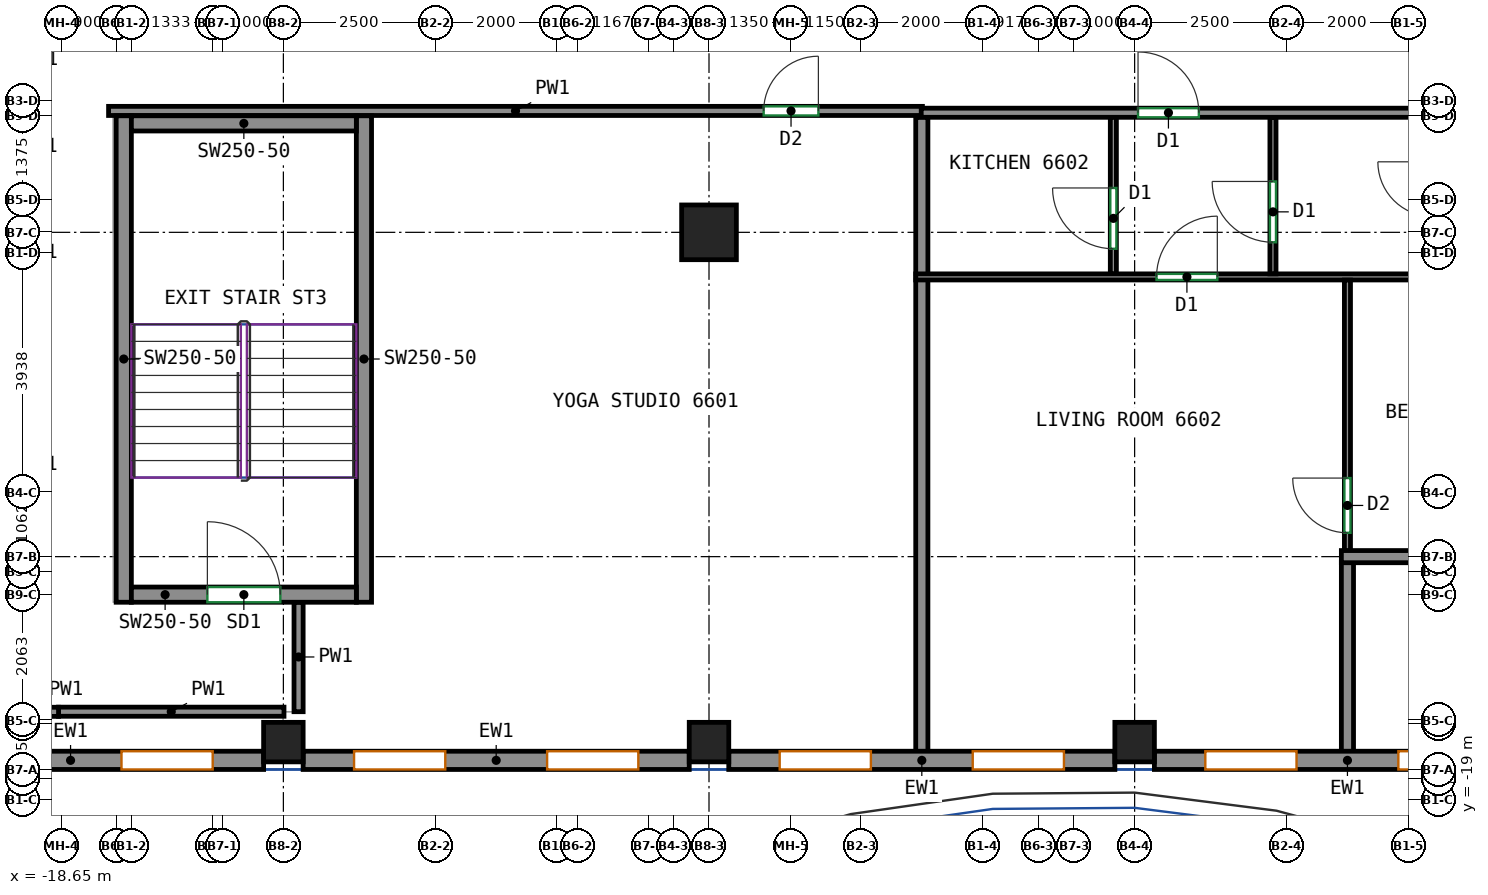
"""IFC4 building model, lengths in metres.
Left out: names, types, materials, properties, quantities, classifications, styles, units other than length and angle.
Written with IfcOpenShell. Run it as: python <this file> out.ifc"""

import sys

from ifc_helpers import new_model, si_unit, direction, frame, frame_2d, origin, origin_2d, place, context, subcontext, project, spatial, rectangle, extrude, source, transform, mapped, element, fill, save


model = new_model("IFC4")
c1 = context("Model", 3, precision=1e-05, world=origin(), true_north=direction((0.0, 1.0)))
c2 = subcontext(c1, "Body", "Model", "MODEL_VIEW")
j1 = project(units=[si_unit("LENGTHUNIT", "METRE"), si_unit("PLANEANGLEUNIT", "RADIAN")], contexts=[c1])
p1 = place(None, origin())
s1 = spatial("IfcSite", under=j1, at=p1, CompositionType="ELEMENT")
p2 = place(p1, origin())
s2 = spatial("IfcBuilding", under=s1, at=p2, CompositionType="ELEMENT")
p3 = place(p2, frame((0.0, 0.0, 270.4)))
s3 = spatial("IfcBuildingStorey", under=s2, at=p3, CompositionType="ELEMENT", Elevation=270.4)
m1 = source(origin(), c2, "Body", "SweptSolid", [
    extrude(rectangle(XDim=0.65, YDim=0.65, at=origin_2d()), origin(), (0.0, 0.0, 1.0), 3.12),
])
for number, where, z_axis, x_axis in (
    (1, (-15.0, -18.05, 0.0), (0.0, 0.0, 1.0), (1.0, 0.0, 0.0)),
    (2, (-8.0, -18.05, 0.0), (0.0, 0.0, 1.0), (1.0, 0.0, 0.0)),
):
    element("IfcColumn", number, at=place(p3, frame(where, z_axis=z_axis, x_axis=x_axis)), inside=s3, PredefinedType="COLUMN", context=c2, shape_type="MappedRepresentation", body=[
        mapped(m1, transform((0.0, 0.0, 0.0))),
    ])
m2 = source(origin(), c2, "Body", "SweptSolid", [
    extrude(rectangle(XDim=0.9, YDim=0.9, at=origin_2d()), origin(), (0.0, 0.0, 1.0), 3.12),
])
p4 = place(p3, frame((-8.0, -9.667, 0.0), z_axis=(0.0, 0.0, 1.0), x_axis=(1.0, 0.0, 0.0)))
e3 = element("IfcColumn", 3, at=p4, inside=s3, PredefinedType="COLUMN", context=c2, shape_type="MappedRepresentation", body=[
    mapped(m2, transform((0.0, 0.0, 0.0))),
])
p5 = place(p3, frame((-1.0, -18.05, 0.0), z_axis=(0.0, 0.0, 1.0), x_axis=(1.0, 0.0, 0.0)))
e4 = element("IfcColumn", 4, at=p5, inside=s3, PredefinedType="COLUMN", context=c2, shape_type="MappedRepresentation", body=[
    mapped(m1, transform((0.0, 0.0, 0.0))),
])
m3 = source(origin(), c2, "Body", "SweptSolid", [
    extrude(rectangle(XDim=8.0, YDim=0.25, at=frame_2d((4.0, 0.0))), origin(), (0.0, 0.0, 1.0), 3.12),
])
for number, where, z_axis, x_axis in (
    (5, (-17.625, -15.75, 0.0), (0.0, 0.0, 1.0), (0.0, 1.0, 0.0)),
    (6, (-13.675, -15.75, 0.0), (0.0, 0.0, 1.0), (0.0, 1.0, 0.0)),
):
    element("IfcWall", number, at=place(p3, frame(where, z_axis=z_axis, x_axis=x_axis)), inside=s3, PredefinedType="SHEAR", context=c2, shape_type="MappedRepresentation", body=[
        mapped(m3, transform((0.0, 0.0, 0.0))),
    ])
m4 = source(origin(), c2, "Body", "SweptSolid", [
    extrude(rectangle(XDim=3.7, YDim=0.25, at=frame_2d((1.85, 0.0))), origin(), (0.0, 0.0, 1.0), 3.12),
])
p6 = place(p3, frame((-17.5, -15.625, 0.0), z_axis=(0.0, 0.0, 1.0), x_axis=(1.0, 0.0, 0.0)))
e7 = element("IfcWall", 7, at=p6, inside=s3, PredefinedType="SHEAR", context=c2, shape_type="MappedRepresentation", body=[
    mapped(m4, transform((0.0, 0.0, 0.0))),
])
p7 = place(p6, frame((1.25, 0.0, 0.0)))
e8 = element("IfcOpeningElement", 8, at=p7, cuts=e7, PredefinedType="OPENING", context=c2, shape_type="SweptSolid", body=[
    extrude(rectangle(XDim=1.2, YDim=2.1, at=frame_2d((0.6, 1.05))), frame((0.0, 0.135, 0.0), z_axis=(0.0, -1.0, 0.0), x_axis=(1.0, 0.0, 0.0)), (0.0, 0.0, 1.0), 0.27),
])
p8 = place(p3, frame((-17.5, -7.875, 0.0), z_axis=(0.0, 0.0, 1.0), x_axis=(1.0, 0.0, 0.0)))
e9 = element("IfcWall", 9, at=p8, inside=s3, PredefinedType="SHEAR", context=c2, shape_type="MappedRepresentation", body=[
    mapped(m4, transform((0.0, 0.0, 0.0))),
])
m5 = source(origin(), c2, "Body", "SweptSolid", [
    extrude(rectangle(XDim=6.35, YDim=0.3, at=frame_2d((3.175, 0.0))), origin(), (0.0, 0.0, 1.0), 3.12),
])
p9 = place(p3, frame((-21.675, -18.35, 0.0), z_axis=(0.0, 0.0, 1.0), x_axis=(1.0, 0.0, 0.0)))
e10 = element("IfcWall", 10, at=p9, inside=s3, PredefinedType="SOLIDWALL", context=c2, shape_type="MappedRepresentation", body=[
    mapped(m5, transform((0.0, 0.0, 0.0))),
])
p10 = place(p9, frame((0.837, 0.0, 0.8)))
e11 = element("IfcOpeningElement", 11, at=p10, cuts=e10, PredefinedType="OPENING", context=c2, shape_type="SweptSolid", body=[
    extrude(rectangle(XDim=1.5, YDim=2.05, at=frame_2d((0.75, 1.025))), frame((0.0, 0.16, 0.0), z_axis=(0.0, -1.0, 0.0), x_axis=(1.0, 0.0, 0.0)), (0.0, 0.0, 1.0), 0.32),
])
p11 = place(p9, frame((4.012, 0.0, 0.8)))
e12 = element("IfcOpeningElement", 12, at=p11, cuts=e10, PredefinedType="OPENING", context=c2, shape_type="SweptSolid", body=[
    extrude(rectangle(XDim=1.5, YDim=2.05, at=frame_2d((0.75, 1.025))), frame((0.0, 0.16, 0.0), z_axis=(0.0, -1.0, 0.0), x_axis=(1.0, 0.0, 0.0)), (0.0, 0.0, 1.0), 0.32),
])
p12 = place(p3, frame((-14.675, -18.35, 0.0), z_axis=(0.0, 0.0, 1.0), x_axis=(1.0, 0.0, 0.0)))
e13 = element("IfcWall", 13, at=p12, inside=s3, PredefinedType="SOLIDWALL", context=c2, shape_type="MappedRepresentation", body=[
    mapped(m5, transform((0.0, 0.0, 0.0))),
])
p13 = place(p12, frame((0.837, 0.0, 0.8)))
e14 = element("IfcOpeningElement", 14, at=p13, cuts=e13, PredefinedType="OPENING", context=c2, shape_type="SweptSolid", body=[
    extrude(rectangle(XDim=1.5, YDim=2.05, at=frame_2d((0.75, 1.025))), frame((0.0, 0.16, 0.0), z_axis=(0.0, -1.0, 0.0), x_axis=(1.0, 0.0, 0.0)), (0.0, 0.0, 1.0), 0.32),
])
p14 = place(p12, frame((4.012, 0.0, 0.8)))
e15 = element("IfcOpeningElement", 15, at=p14, cuts=e13, PredefinedType="OPENING", context=c2, shape_type="SweptSolid", body=[
    extrude(rectangle(XDim=1.5, YDim=2.05, at=frame_2d((0.75, 1.025))), frame((0.0, 0.16, 0.0), z_axis=(0.0, -1.0, 0.0), x_axis=(1.0, 0.0, 0.0)), (0.0, 0.0, 1.0), 0.32),
])
p15 = place(p3, frame((-7.675, -18.35, 0.0), z_axis=(0.0, 0.0, 1.0), x_axis=(1.0, 0.0, 0.0)))
e16 = element("IfcWall", 16, at=p15, inside=s3, PredefinedType="SOLIDWALL", context=c2, shape_type="MappedRepresentation", body=[
    mapped(m5, transform((0.0, 0.0, 0.0))),
])
p16 = place(p15, frame((0.837, 0.0, 0.8)))
e17 = element("IfcOpeningElement", 17, at=p16, cuts=e16, PredefinedType="OPENING", context=c2, shape_type="SweptSolid", body=[
    extrude(rectangle(XDim=1.5, YDim=2.05, at=frame_2d((0.75, 1.025))), frame((0.0, 0.16, 0.0), z_axis=(0.0, -1.0, 0.0), x_axis=(1.0, 0.0, 0.0)), (0.0, 0.0, 1.0), 0.32),
])
p17 = place(p15, frame((4.012, 0.0, 0.8)))
e18 = element("IfcOpeningElement", 18, at=p17, cuts=e16, PredefinedType="OPENING", context=c2, shape_type="SweptSolid", body=[
    extrude(rectangle(XDim=1.5, YDim=2.05, at=frame_2d((0.75, 1.025))), frame((0.0, 0.16, 0.0), z_axis=(0.0, -1.0, 0.0), x_axis=(1.0, 0.0, 0.0)), (0.0, 0.0, 1.0), 0.32),
])
p18 = place(p3, frame((-0.675, -18.35, 0.0), z_axis=(0.0, 0.0, 1.0), x_axis=(1.0, 0.0, 0.0)))
e19 = element("IfcWall", 19, at=p18, inside=s3, PredefinedType="SOLIDWALL", context=c2, shape_type="MappedRepresentation", body=[
    mapped(m5, transform((0.0, 0.0, 0.0))),
])
p19 = place(p18, frame((0.837, 0.0, 0.8)))
e20 = element("IfcOpeningElement", 20, at=p19, cuts=e19, PredefinedType="OPENING", context=c2, shape_type="SweptSolid", body=[
    extrude(rectangle(XDim=1.5, YDim=2.05, at=frame_2d((0.75, 1.025))), frame((0.0, 0.16, 0.0), z_axis=(0.0, -1.0, 0.0), x_axis=(1.0, 0.0, 0.0)), (0.0, 0.0, 1.0), 0.32),
])
p20 = place(p18, frame((4.012, 0.0, 0.8)))
e21 = element("IfcOpeningElement", 21, at=p20, cuts=e19, PredefinedType="OPENING", context=c2, shape_type="SweptSolid", body=[
    extrude(rectangle(XDim=1.5, YDim=2.05, at=frame_2d((0.75, 1.025))), frame((0.0, 0.16, 0.0), z_axis=(0.0, -1.0, 0.0), x_axis=(1.0, 0.0, 0.0)), (0.0, 0.0, 1.0), 0.32),
])
p21 = place(p3, frame((-17.875, -7.67, 0.0), z_axis=(0.0, 0.0, 1.0), x_axis=(1.0, 0.0, 0.0)))
e22 = element("IfcWall", 22, at=p21, inside=s3, PredefinedType="PARTITIONING", context=c2, shape_type="SweptSolid", body=[
    extrude(rectangle(XDim=13.385, YDim=0.15, at=frame_2d((6.692, 0.0))), origin(), (0.0, 0.0, 1.0), 3.12),
])
p22 = place(p21, frame((10.774, 0.0, 0.0)))
e23 = element("IfcOpeningElement", 23, at=p22, cuts=e22, PredefinedType="OPENING", context=c2, shape_type="SweptSolid", body=[
    extrude(rectangle(XDim=0.9, YDim=2.1, at=frame_2d((0.45, 1.05))), frame((0.0, 0.085, 0.0), z_axis=(0.0, -1.0, 0.0), x_axis=(1.0, 0.0, 0.0)), (0.0, 0.0, 1.0), 0.17),
])
p23 = place(p3, frame((-14.75, -17.55, 0.0), z_axis=(0.0, 0.0, 1.0), x_axis=(0.0, 1.0, 0.0)))
e24 = element("IfcWall", 24, at=p23, inside=s3, PredefinedType="PARTITIONING", context=c2, shape_type="SweptSolid", body=[
    extrude(rectangle(XDim=1.8, YDim=0.15, at=frame_2d((0.9, 0.0))), origin(), (0.0, 0.0, 1.0), 3.12),
])
p24 = place(p3, frame((-18.698, -17.55, 0.0), z_axis=(0.0, 0.0, 1.0), x_axis=(1.0, 0.0, 0.0)))
e25 = element("IfcWall", 25, at=p24, inside=s3, PredefinedType="PARTITIONING", context=c2, shape_type="SweptSolid", body=[
    extrude(rectangle(XDim=3.708, YDim=0.15, at=frame_2d((1.854, 0.0))), origin(), (0.0, 0.0, 1.0), 3.12),
])
p25 = place(p3, frame((-19.677, -17.552, 0.0), z_axis=(0.0, 0.0, 1.0), x_axis=(1.0, 0.0, 0.0)))
e26 = element("IfcWall", 26, at=p25, inside=s3, PredefinedType="PARTITIONING", context=c2, shape_type="SweptSolid", body=[
    extrude(rectangle(XDim=0.979, YDim=0.15, at=frame_2d((0.49, 0.0))), origin(), (0.0, 0.0, 1.0), 3.12),
])
p26 = place(p3, frame((-4.51, -7.7, 0.0), z_axis=(0.0, 0.0, 1.0), x_axis=(1.0, 0.0, 0.0)))
e27 = element("IfcWall", 27, at=p26, inside=s3, PredefinedType="PARTITIONING", context=c2, shape_type="SweptSolid", body=[
    extrude(rectangle(XDim=19.76, YDim=0.15, at=frame_2d((9.88, 0.0))), origin(), (0.0, 0.0, 1.0), 3.12),
])
p27 = place(p26, frame((3.566, 0.0, 0.0)))
e28 = element("IfcOpeningElement", 28, at=p27, cuts=e27, PredefinedType="OPENING", context=c2, shape_type="SweptSolid", body=[
    extrude(rectangle(XDim=1.0, YDim=2.1, at=frame_2d((0.5, 1.05))), frame((0.0, 0.085, 0.0), z_axis=(0.0, -1.0, 0.0), x_axis=(1.0, 0.0, 0.0)), (0.0, 0.0, 1.0), 0.17),
])
p28 = place(p26, frame((16.08, 0.0, 0.0)))
e29 = element("IfcOpeningElement", 29, at=p28, cuts=e27, PredefinedType="OPENING", context=c2, shape_type="SweptSolid", body=[
    extrude(rectangle(XDim=1.0, YDim=2.1, at=frame_2d((0.5, 1.05))), frame((0.0, 0.085, 0.0), z_axis=(0.0, -1.0, 0.0), x_axis=(1.0, 0.0, 0.0)), (0.0, 0.0, 1.0), 0.17),
])
p29 = place(p3, frame((-4.5, -10.36, 0.0), z_axis=(0.0, 0.0, 1.0), x_axis=(0.0, 1.0, 0.0)))
e30 = element("IfcWall", 30, at=p29, inside=s3, PredefinedType="PARTITIONING", context=c2, shape_type="SweptSolid", body=[
    extrude(rectangle(XDim=2.583, YDim=0.2, at=frame_2d((1.292, 0.0))), origin(), (0.0, 0.0, 1.0), 3.12),
])
p30 = place(p3, frame((-4.5, -18.25, 0.0), z_axis=(0.0, 0.0, 1.0), x_axis=(0.0, 1.0, 0.0)))
e31 = element("IfcWall", 31, at=p30, inside=s3, PredefinedType="PARTITIONING", context=c2, shape_type="SweptSolid", body=[
    extrude(rectangle(XDim=7.808, YDim=0.2, at=frame_2d((3.904, 0.0))), origin(), (0.0, 0.0, 1.0), 3.12),
])
p31 = place(p3, frame((-1.35, -10.35, 0.0), z_axis=(0.0, 0.0, 1.0), x_axis=(0.0, 1.0, 0.0)))
e32 = element("IfcWall", 32, at=p31, inside=s3, PredefinedType="PARTITIONING", context=c2, shape_type="SweptSolid", body=[
    extrude(rectangle(XDim=2.573, YDim=0.1, at=frame_2d((1.287, 0.0))), origin(), (0.0, 0.0, 1.0), 3.12),
])
p32 = place(p31, frame((0.413, 0.0, 0.0)))
e33 = element("IfcOpeningElement", 33, at=p32, cuts=e32, PredefinedType="OPENING", context=c2, shape_type="SweptSolid", body=[
    extrude(rectangle(XDim=1.0, YDim=2.1, at=frame_2d((0.5, 1.05))), frame((0.0, 0.06, 0.0), z_axis=(0.0, -1.0, 0.0), x_axis=(1.0, 0.0, 0.0)), (0.0, 0.0, 1.0), 0.12),
])
p33 = place(p3, frame((-4.6, -10.4, 0.0), z_axis=(0.0, 0.0, 1.0), x_axis=(1.0, 0.0, 0.0)))
e34 = element("IfcWall", 34, at=p33, inside=s3, PredefinedType="PARTITIONING", context=c2, shape_type="SweptSolid", body=[
    extrude(rectangle(XDim=22.35, YDim=0.1, at=frame_2d((11.175, 0.0))), origin(), (0.0, 0.0, 1.0), 3.12),
])
p34 = place(p33, frame((3.96, 0.0, 0.0)))
e35 = element("IfcOpeningElement", 35, at=p34, cuts=e34, PredefinedType="OPENING", context=c2, shape_type="SweptSolid", body=[
    extrude(rectangle(XDim=1.0, YDim=2.1, at=frame_2d((0.5, 1.05))), frame((0.0, 0.06, 0.0), z_axis=(0.0, -1.0, 0.0), x_axis=(1.0, 0.0, 0.0)), (0.0, 0.0, 1.0), 0.12),
])
p35 = place(p33, frame((15.666, 0.0, 0.0)))
e36 = element("IfcOpeningElement", 36, at=p35, cuts=e34, PredefinedType="OPENING", context=c2, shape_type="SweptSolid", body=[
    extrude(rectangle(XDim=1.0, YDim=2.1, at=frame_2d((0.5, 1.05))), frame((0.0, 0.06, 0.0), z_axis=(0.0, -1.0, 0.0), x_axis=(1.0, 0.0, 0.0)), (0.0, 0.0, 1.0), 0.12),
])
p36 = place(p33, frame((18.109, 0.0, 0.0)))
e37 = element("IfcOpeningElement", 37, at=p36, cuts=e34, PredefinedType="OPENING", context=c2, shape_type="SweptSolid", body=[
    extrude(rectangle(XDim=1.0, YDim=2.1, at=frame_2d((0.5, 1.05))), frame((0.0, 0.06, 0.0), z_axis=(0.0, -1.0, 0.0), x_axis=(1.0, 0.0, 0.0)), (0.0, 0.0, 1.0), 0.12),
])
p37 = place(p3, frame((1.275, -10.35, 0.0), z_axis=(0.0, 0.0, 1.0), x_axis=(0.0, 1.0, 0.0)))
e38 = element("IfcWall", 38, at=p37, inside=s3, PredefinedType="PARTITIONING", context=c2, shape_type="SweptSolid", body=[
    extrude(rectangle(XDim=2.573, YDim=0.1, at=frame_2d((1.287, 0.0))), origin(), (0.0, 0.0, 1.0), 3.12),
])
p38 = place(p37, frame((0.52, 0.0, 0.0)))
e39 = element("IfcOpeningElement", 39, at=p38, cuts=e38, PredefinedType="OPENING", context=c2, shape_type="SweptSolid", body=[
    extrude(rectangle(XDim=1.0, YDim=2.1, at=frame_2d((0.5, 1.05))), frame((0.0, 0.06, 0.0), z_axis=(0.0, -1.0, 0.0), x_axis=(1.0, 0.0, 0.0)), (0.0, 0.0, 1.0), 0.12),
])
p39 = place(p3, frame((2.5, -14.91, 0.0), z_axis=(0.0, 0.0, 1.0), x_axis=(0.0, 1.0, 0.0)))
e40 = element("IfcWall", 40, at=p39, inside=s3, PredefinedType="PARTITIONING", context=c2, shape_type="SweptSolid", body=[
    extrude(rectangle(XDim=4.458, YDim=0.1, at=frame_2d((2.229, 0.0))), origin(), (0.0, 0.0, 1.0), 3.12),
])
p40 = place(p39, frame((0.302, 0.0, 0.0)))
e41 = element("IfcOpeningElement", 41, at=p40, cuts=e40, PredefinedType="OPENING", context=c2, shape_type="SweptSolid", body=[
    extrude(rectangle(XDim=0.9, YDim=2.1, at=frame_2d((0.45, 1.05))), frame((0.0, 0.06, 0.0), z_axis=(0.0, -1.0, 0.0), x_axis=(1.0, 0.0, 0.0)), (0.0, 0.0, 1.0), 0.12),
])
p41 = place(p3, frame((2.5, -18.25, 0.0), z_axis=(0.0, 0.0, 1.0), x_axis=(0.0, 1.0, 0.0)))
e42 = element("IfcWall", 42, at=p41, inside=s3, PredefinedType="PARTITIONING", context=c2, shape_type="SweptSolid", body=[
    extrude(rectangle(XDim=3.16, YDim=0.2, at=frame_2d((1.58, 0.0))), origin(), (0.0, 0.0, 1.0), 3.12),
])
p42 = place(p3, frame((2.4, -15.0, 0.0), z_axis=(0.0, 0.0, 1.0), x_axis=(1.0, 0.0, 0.0)))
e43 = element("IfcWall", 43, at=p42, inside=s3, PredefinedType="PARTITIONING", context=c2, shape_type="SweptSolid", body=[
    extrude(rectangle(XDim=3.7, YDim=0.2, at=frame_2d((1.85, 0.0))), origin(), (0.0, 0.0, 1.0), 3.12),
])
p43 = place(p11, origin())
e44 = element("IfcWindow", 44, at=p43, inside=s3, PartitioningType="SINGLE_PANEL", PredefinedType="WINDOW", context=c2, shape_type="SweptSolid", body=[
    extrude(rectangle(XDim=1.5, YDim=2.05, at=frame_2d((0.75, 1.025))), frame((0.0, 0.03, 0.0), z_axis=(0.0, -1.0, 0.0), x_axis=(1.0, 0.0, 0.0)), (0.0, 0.0, 1.0), 0.06),
])
fill(e12, e44)
p44 = place(p13, origin())
e45 = element("IfcWindow", 45, at=p44, inside=s3, PartitioningType="SINGLE_PANEL", PredefinedType="WINDOW", context=c2, shape_type="SweptSolid", body=[
    extrude(rectangle(XDim=1.5, YDim=2.05, at=frame_2d((0.75, 1.025))), frame((0.0, 0.03, 0.0), z_axis=(0.0, -1.0, 0.0), x_axis=(1.0, 0.0, 0.0)), (0.0, 0.0, 1.0), 0.06),
])
fill(e14, e45)
p45 = place(p14, origin())
e46 = element("IfcWindow", 46, at=p45, inside=s3, PartitioningType="SINGLE_PANEL", PredefinedType="WINDOW", context=c2, shape_type="SweptSolid", body=[
    extrude(rectangle(XDim=1.5, YDim=2.05, at=frame_2d((0.75, 1.025))), frame((0.0, 0.03, 0.0), z_axis=(0.0, -1.0, 0.0), x_axis=(1.0, 0.0, 0.0)), (0.0, 0.0, 1.0), 0.06),
])
fill(e15, e46)
p46 = place(p16, origin())
e47 = element("IfcWindow", 47, at=p46, inside=s3, PartitioningType="SINGLE_PANEL", PredefinedType="WINDOW", context=c2, shape_type="SweptSolid", body=[
    extrude(rectangle(XDim=1.5, YDim=2.05, at=frame_2d((0.75, 1.025))), frame((0.0, 0.03, 0.0), z_axis=(0.0, -1.0, 0.0), x_axis=(1.0, 0.0, 0.0)), (0.0, 0.0, 1.0), 0.06),
])
fill(e17, e47)
p47 = place(p17, origin())
e48 = element("IfcWindow", 48, at=p47, inside=s3, PartitioningType="SINGLE_PANEL", PredefinedType="WINDOW", context=c2, shape_type="SweptSolid", body=[
    extrude(rectangle(XDim=1.5, YDim=2.05, at=frame_2d((0.75, 1.025))), frame((0.0, 0.03, 0.0), z_axis=(0.0, -1.0, 0.0), x_axis=(1.0, 0.0, 0.0)), (0.0, 0.0, 1.0), 0.06),
])
fill(e18, e48)
p48 = place(p19, origin())
e49 = element("IfcWindow", 49, at=p48, inside=s3, PartitioningType="SINGLE_PANEL", PredefinedType="WINDOW", context=c2, shape_type="SweptSolid", body=[
    extrude(rectangle(XDim=1.5, YDim=2.05, at=frame_2d((0.75, 1.025))), frame((0.0, 0.03, 0.0), z_axis=(0.0, -1.0, 0.0), x_axis=(1.0, 0.0, 0.0)), (0.0, 0.0, 1.0), 0.06),
])
fill(e20, e49)
p49 = place(p20, origin())
e50 = element("IfcWindow", 50, at=p49, inside=s3, PartitioningType="SINGLE_PANEL", PredefinedType="WINDOW", context=c2, shape_type="SweptSolid", body=[
    extrude(rectangle(XDim=1.5, YDim=2.05, at=frame_2d((0.75, 1.025))), frame((0.0, 0.03, 0.0), z_axis=(0.0, -1.0, 0.0), x_axis=(1.0, 0.0, 0.0)), (0.0, 0.0, 1.0), 0.06),
])
fill(e21, e50)
p50 = place(p7, origin())
e51 = element("IfcDoor", 51, at=p50, inside=s3, OperationType="DOUBLE_DOOR_SINGLE_SWING", PredefinedType="DOOR", context=c2, shape_type="SweptSolid", body=[
    extrude(rectangle(XDim=1.2, YDim=2.1, at=frame_2d((0.6, 1.05))), frame((0.0, 0.025, 0.0), z_axis=(0.0, -1.0, 0.0), x_axis=(1.0, 0.0, 0.0)), (0.0, 0.0, 1.0), 0.05),
])
fill(e8, e51)
p51 = place(p40, origin())
e52 = element("IfcDoor", 52, at=p51, inside=s3, OperationType="SINGLE_SWING_RIGHT", PredefinedType="DOOR", context=c2, shape_type="SweptSolid", body=[
    extrude(rectangle(XDim=0.9, YDim=2.1, at=frame_2d((0.45, 1.05))), frame((0.0, 0.025, 0.0), z_axis=(0.0, -1.0, 0.0), x_axis=(1.0, 0.0, 0.0)), (0.0, 0.0, 1.0), 0.05),
])
fill(e41, e52)
p52 = place(p34, origin())
e53 = element("IfcDoor", 53, at=p52, inside=s3, OperationType="SINGLE_SWING_RIGHT", PredefinedType="DOOR", context=c2, shape_type="SweptSolid", body=[
    extrude(rectangle(XDim=1.0, YDim=2.1, at=frame_2d((0.5, 1.05))), frame((0.0, 0.025, 0.0), z_axis=(0.0, -1.0, 0.0), x_axis=(1.0, 0.0, 0.0)), (0.0, 0.0, 1.0), 0.05),
])
fill(e35, e53)
p53 = place(p32, origin())
e54 = element("IfcDoor", 54, at=p53, inside=s3, OperationType="SINGLE_SWING_RIGHT", PredefinedType="DOOR", context=c2, shape_type="SweptSolid", body=[
    extrude(rectangle(XDim=1.0, YDim=2.1, at=frame_2d((0.5, 1.05))), frame((0.0, 0.025, 0.0), z_axis=(0.0, -1.0, 0.0), x_axis=(1.0, 0.0, 0.0)), (0.0, 0.0, 1.0), 0.05),
])
fill(e33, e54)
p54 = place(p38, origin())
e55 = element("IfcDoor", 55, at=p54, inside=s3, OperationType="SINGLE_SWING_RIGHT", PredefinedType="DOOR", context=c2, shape_type="SweptSolid", body=[
    extrude(rectangle(XDim=1.0, YDim=2.1, at=frame_2d((0.5, 1.05))), frame((0.0, 0.025, 0.0), z_axis=(0.0, -1.0, 0.0), x_axis=(1.0, 0.0, 0.0)), (0.0, 0.0, 1.0), 0.05),
])
fill(e39, e55)
p55 = place(p27, origin())
e56 = element("IfcDoor", 56, at=p55, inside=s3, OperationType="SINGLE_SWING_LEFT", PredefinedType="DOOR", context=c2, shape_type="SweptSolid", body=[
    extrude(rectangle(XDim=1.0, YDim=2.1, at=frame_2d((0.5, 1.05))), frame((0.0, 0.025, 0.0), z_axis=(0.0, -1.0, 0.0), x_axis=(1.0, 0.0, 0.0)), (0.0, 0.0, 1.0), 0.05),
])
fill(e28, e56)
p56 = place(p22, origin())
e57 = element("IfcDoor", 57, at=p56, inside=s3, OperationType="SINGLE_SWING_RIGHT", PredefinedType="DOOR", context=c2, shape_type="SweptSolid", body=[
    extrude(rectangle(XDim=0.9, YDim=2.1, at=frame_2d((0.45, 1.05))), frame((0.0, 0.025, 0.0), z_axis=(0.0, -1.0, 0.0), x_axis=(1.0, 0.0, 0.0)), (0.0, 0.0, 1.0), 0.05),
])
fill(e23, e57)
save(model, sys.argv[1])
